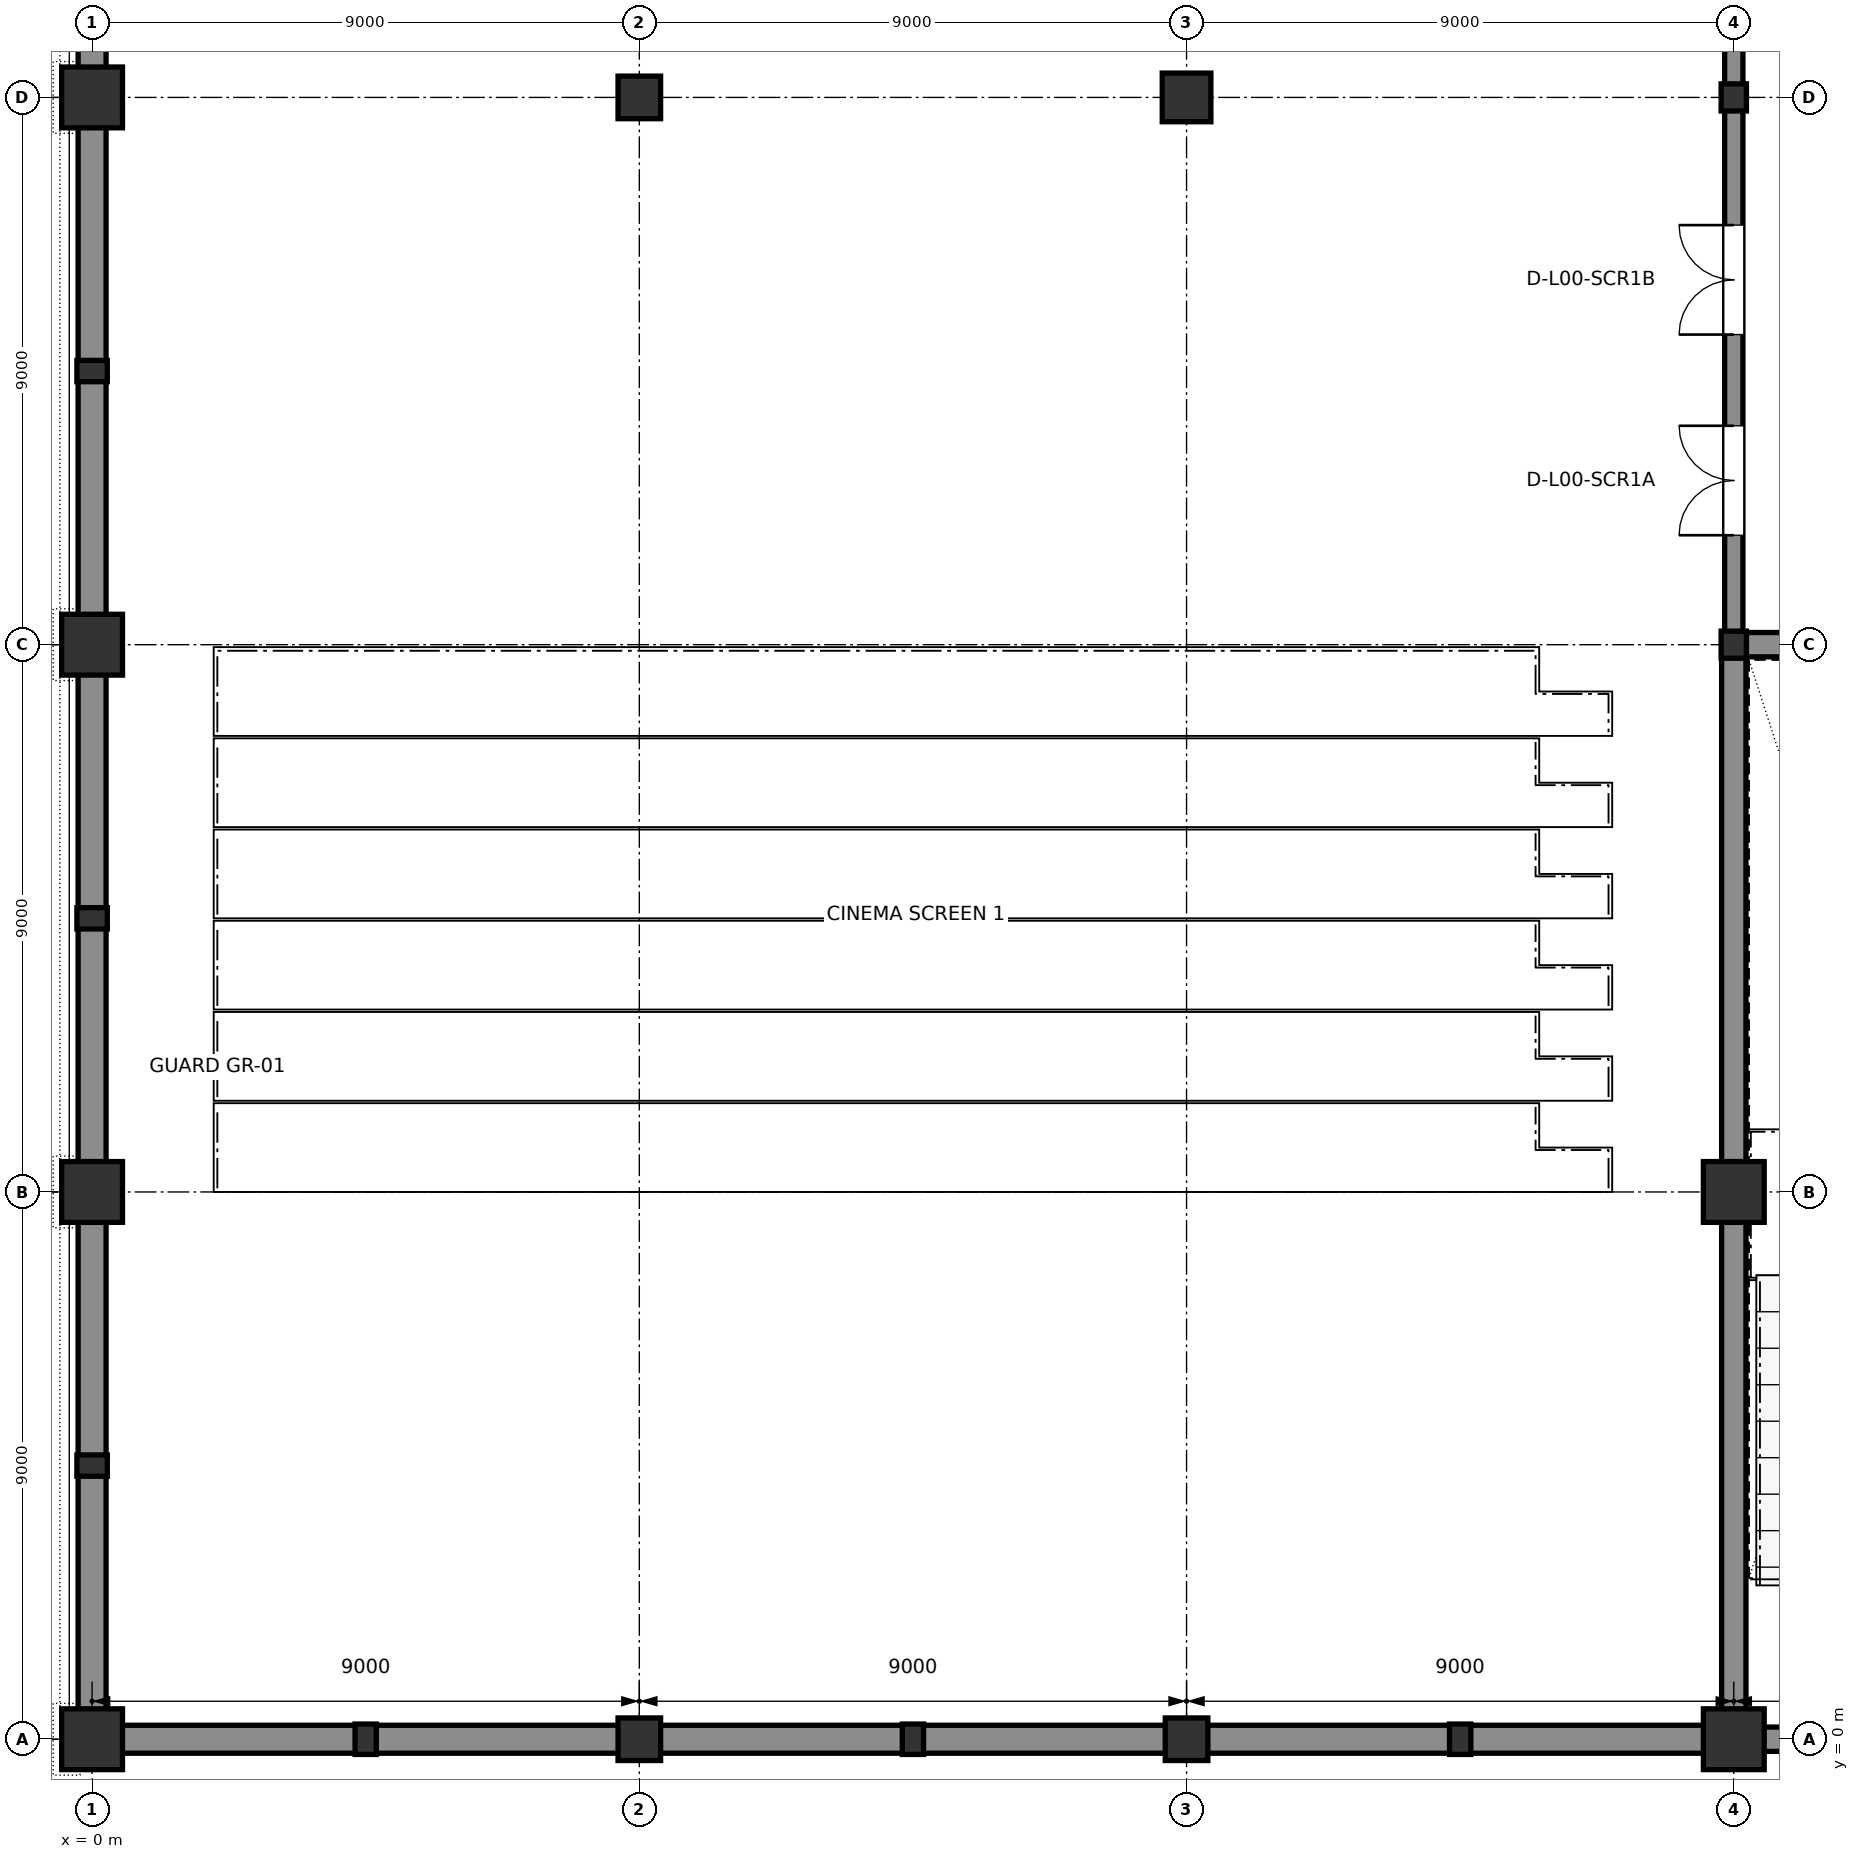
"""IFC4 building model, lengths in metres.
Left out: names, types, materials, properties, quantities, classifications, styles, units other than length and angle.
Written with IfcOpenShell. Run it as: python <this file> out.ifc"""

import sys

from ifc_helpers import new_model, si_unit, direction, frame, frame_2d, origin, origin_2d, place, context, subcontext, project, spatial, rectangle, i_section, extrude, element, fill, save


model = new_model("IFC4")
c1 = context("Model", 3, precision=1e-05, world=origin(), true_north=direction((0.0, 1.0)))
c2 = subcontext(c1, "Body", "Model", "MODEL_VIEW")
j1 = project(units=[si_unit("LENGTHUNIT", "METRE"), si_unit("PLANEANGLEUNIT", "RADIAN")], contexts=[c1])
p1 = place(None, origin())
s1 = spatial("IfcSite", under=j1, at=p1, CompositionType="ELEMENT")
p2 = place(p1, origin())
s2 = spatial("IfcBuilding", under=s1, at=p2, CompositionType="ELEMENT")
p3 = place(p2, origin())
s3 = spatial("IfcBuildingStorey", under=s2, at=p3, CompositionType="ELEMENT", Elevation=0.0)
for number, where, z_axis, x_axis in (
    (1, (4.5, 0.0, 0.0), (0.0, 0.0, 1.0), (1.0, 0.0, 0.0)),
    (2, (13.5, 0.0, 0.0), (0.0, 0.0, 1.0), (1.0, 0.0, 0.0)),
    (3, (22.5, 0.0, 0.0), (0.0, 0.0, 1.0), (1.0, 0.0, 0.0)),
    (4, (0.0, 4.5, 0.0), (0.0, 0.0, 1.0), (0.0, 1.0, 0.0)),
    (5, (0.0, 13.5, 0.0), (0.0, 0.0, 1.0), (0.0, 1.0, 0.0)),
    (6, (0.0, 22.5, 0.0), (0.0, 0.0, 1.0), (0.0, 1.0, 0.0)),
):
    element("IfcColumn", number, at=place(p3, frame(where, z_axis=z_axis, x_axis=x_axis)), inside=s3, PredefinedType="PILASTER", context=c2, shape_type="SweptSolid", body=[
        extrude(rectangle(XDim=0.35, YDim=0.5, at=origin_2d()), origin(), (0.0, 0.0, 1.0), 5.4),
    ])
for number, where, z_axis, x_axis in (
    (7, (0.0, 0.0, 0.0), (0.0, 0.0, 1.0), (1.0, 0.0, 0.0)),
    (8, (0.0, 9.0, 0.0), (0.0, 0.0, 1.0), (1.0, 0.0, 0.0)),
    (9, (0.0, 18.0, 0.0), (0.0, 0.0, 1.0), (1.0, 0.0, 0.0)),
    (10, (0.0, 27.0, 0.0), (0.0, 0.0, 1.0), (1.0, 0.0, 0.0)),
):
    element("IfcColumn", number, at=place(p3, frame(where, z_axis=z_axis, x_axis=x_axis)), inside=s3, PredefinedType="COLUMN", context=c2, shape_type="SweptSolid", body=[
        extrude(rectangle(XDim=1.0, YDim=1.0, at=origin_2d()), origin(), (0.0, 0.0, 1.0), 5.4),
    ])
for number, where, z_axis, x_axis in (
    (11, (9.0, 0.0, 0.0), (0.0, 0.0, 1.0), (1.0, 0.0, 0.0)),
    (12, (9.0, 27.0, 0.0), (0.0, 0.0, 1.0), (1.0, 0.0, 0.0)),
    (13, (18.0, 0.0, 0.0), (0.0, 0.0, 1.0), (1.0, 0.0, 0.0)),
):
    element("IfcColumn", number, at=place(p3, frame(where, z_axis=z_axis, x_axis=x_axis)), inside=s3, PredefinedType="COLUMN", context=c2, shape_type="SweptSolid", body=[
        extrude(rectangle(XDim=0.7, YDim=0.7, at=origin_2d()), origin(), (0.0, 0.0, 1.0), 5.4),
    ])
p4 = place(p3, frame((18.0, 27.0, 0.0), z_axis=(0.0, 0.0, 1.0), x_axis=(1.0, 0.0, 0.0)))
e14 = element("IfcColumn", 14, at=p4, inside=s3, PredefinedType="COLUMN", context=c2, shape_type="SweptSolid", body=[
    extrude(rectangle(XDim=0.8, YDim=0.8, at=origin_2d()), origin(), (0.0, 0.0, 1.0), 5.4),
])
for number, where, z_axis, x_axis in (
    (15, (27.0, 0.0, 0.0), (0.0, 0.0, 1.0), (1.0, 0.0, 0.0)),
    (16, (27.0, 9.0, 0.0), (0.0, 0.0, 1.0), (1.0, 0.0, 0.0)),
):
    element("IfcColumn", number, at=place(p3, frame(where, z_axis=z_axis, x_axis=x_axis)), inside=s3, PredefinedType="COLUMN", context=c2, shape_type="SweptSolid", body=[
        extrude(rectangle(XDim=1.0, YDim=1.0, at=origin_2d()), origin(), (0.0, 0.0, 1.0), 5.4),
    ])
for number, where, z_axis, x_axis in (
    (17, (27.0, 18.0, 0.0), (0.0, 0.0, 1.0), (1.0, 0.0, 0.0)),
    (18, (27.0, 27.0, 0.0), (0.0, 0.0, 1.0), (1.0, 0.0, 0.0)),
):
    element("IfcColumn", number, at=place(p3, frame(where, z_axis=z_axis, x_axis=x_axis)), inside=s3, PredefinedType="COLUMN", context=c2, shape_type="SweptSolid", body=[
        extrude(i_section(OverallWidth=0.416, OverallDepth=0.446, WebThickness=0.025, FlangeThickness=0.04, at=origin_2d()), origin(), (0.0, 0.0, 1.0), 5.4),
    ])
p5 = place(p3, frame((0.0, 35.515, 0.0), z_axis=(0.0, 0.0, 1.0), x_axis=(0.0, -1.0, 0.0)))
e19 = element("IfcWall", 19, at=p5, inside=s3, PredefinedType="STANDARD", context=c2, shape_type="SweptSolid", body=[
    extrude(rectangle(XDim=8.03, YDim=0.46, at=frame_2d((4.015, 0.0))), origin(), (0.0, 0.0, 1.0), 4.795),
])
for number, where, z_axis, x_axis in (
    (20, (0.0, 8.515, 0.0), (0.0, 0.0, 1.0), (0.0, -1.0, 0.0)),
    (21, (0.0, 17.515, 0.0), (0.0, 0.0, 1.0), (0.0, -1.0, 0.0)),
    (22, (0.0, 26.515, 0.0), (0.0, 0.0, 1.0), (0.0, -1.0, 0.0)),
):
    element("IfcWall", number, at=place(p3, frame(where, z_axis=z_axis, x_axis=x_axis)), inside=s3, PredefinedType="STANDARD", context=c2, shape_type="SweptSolid", body=[
        extrude(rectangle(XDim=8.03, YDim=0.46, at=frame_2d((4.015, 0.0))), origin(), (0.0, 0.0, 1.0), 5.4),
    ])
p6 = place(p3, frame((0.485, 0.0, 0.0), z_axis=(0.0, 0.0, 1.0), x_axis=(1.0, 0.0, 0.0)))
e23 = element("IfcWall", 23, at=p6, inside=s3, PredefinedType="STANDARD", context=c2, shape_type="SweptSolid", body=[
    extrude(rectangle(XDim=8.18, YDim=0.46, at=frame_2d((4.09, 0.0))), origin(), (0.0, 0.0, 1.0), 5.4),
])
p7 = place(p3, frame((9.335, 0.0, 0.0), z_axis=(0.0, 0.0, 1.0), x_axis=(1.0, 0.0, 0.0)))
e24 = element("IfcWall", 24, at=p7, inside=s3, PredefinedType="STANDARD", context=c2, shape_type="SweptSolid", body=[
    extrude(rectangle(XDim=8.33, YDim=0.46, at=frame_2d((4.165, 0.0))), origin(), (0.0, 0.0, 1.0), 5.4),
])
p8 = place(p3, frame((18.335, 0.0, 0.0), z_axis=(0.0, 0.0, 1.0), x_axis=(1.0, 0.0, 0.0)))
e25 = element("IfcWall", 25, at=p8, inside=s3, PredefinedType="STANDARD", context=c2, shape_type="SweptSolid", body=[
    extrude(rectangle(XDim=8.18, YDim=0.46, at=frame_2d((4.09, 0.0))), origin(), (0.0, 0.0, 1.0), 5.4),
])
p9 = place(p3, frame((27.0, 0.0, 0.0), z_axis=(0.0, 0.0, 1.0), x_axis=(1.0, 0.0, 0.0)))
e26 = element("IfcWall", 26, at=p9, inside=s3, PredefinedType="SHEAR", context=c2, shape_type="SweptSolid", body=[
    extrude(rectangle(XDim=9.0, YDim=0.4, at=frame_2d((4.5, 0.0))), origin(), (0.0, 0.0, 1.0), 5.16),
])
p10 = place(p9, frame((1.8, 0.0, 0.0)))
e27 = element("IfcOpeningElement", 27, at=p10, cuts=e26, PredefinedType="OPENING", context=c2, shape_type="SweptSolid", body=[
    extrude(rectangle(XDim=1.8, YDim=2.35, at=frame_2d((0.9, 1.175))), frame((0.0, 0.21, 0.0), z_axis=(0.0, -1.0, 0.0), x_axis=(1.0, 0.0, 0.0)), (0.0, 0.0, 1.0), 0.42),
])
p11 = place(p3, frame((36.0, 18.0, 0.0), z_axis=(0.0, 0.0, 1.0), x_axis=(-1.0, 0.0, 0.0)))
e28 = element("IfcWall", 28, at=p11, inside=s3, PredefinedType="SHEAR", context=c2, shape_type="SweptSolid", body=[
    extrude(rectangle(XDim=9.0, YDim=0.4, at=frame_2d((4.5, 0.0))), origin(), (0.0, 0.0, 1.0), 5.16),
])
p12 = place(p3, frame((27.0, 18.0, 0.0), z_axis=(0.0, 0.0, 1.0), x_axis=(0.0, -1.0, 0.0)))
e29 = element("IfcWall", 29, at=p12, inside=s3, PredefinedType="SHEAR", context=c2, shape_type="SweptSolid", body=[
    extrude(rectangle(XDim=18.0, YDim=0.4, at=frame_2d((9.0, 0.0))), origin(), (0.0, 0.0, 1.0), 5.16),
])
p13 = place(p3, frame((27.0, 18.0, 0.0), z_axis=(0.0, 0.0, 1.0), x_axis=(0.0, 1.0, 0.0)))
e30 = element("IfcWall", 30, at=p13, inside=s3, PredefinedType="SHEAR", context=c2, shape_type="SweptSolid", body=[
    extrude(rectangle(XDim=9.0, YDim=0.3, at=frame_2d((4.5, 0.0))), origin(), (0.0, 0.0, 1.0), 5.16),
])
p14 = place(p13, frame((1.8, 0.0, 0.0)))
e31 = element("IfcOpeningElement", 31, at=p14, cuts=e30, PredefinedType="OPENING", context=c2, shape_type="SweptSolid", body=[
    extrude(rectangle(XDim=1.8, YDim=2.28, at=frame_2d((0.9, 1.14))), frame((0.0, 0.16, 0.0), z_axis=(0.0, -1.0, 0.0), x_axis=(1.0, 0.0, 0.0)), (0.0, 0.0, 1.0), 0.32),
])
p15 = place(p13, frame((5.1, 0.0, 0.0)))
e32 = element("IfcOpeningElement", 32, at=p15, cuts=e30, PredefinedType="OPENING", context=c2, shape_type="SweptSolid", body=[
    extrude(rectangle(XDim=1.8, YDim=2.28, at=frame_2d((0.9, 1.14))), frame((0.0, 0.16, 0.0), z_axis=(0.0, -1.0, 0.0), x_axis=(1.0, 0.0, 0.0)), (0.0, 0.0, 1.0), 0.32),
])
p16 = place(p3, frame((27.0, 27.0, 0.0), z_axis=(0.0, 0.0, 1.0), x_axis=(0.0, 1.0, 0.0)))
e33 = element("IfcWall", 33, at=p16, inside=s3, PredefinedType="SHEAR", context=c2, shape_type="SweptSolid", body=[
    extrude(rectangle(XDim=18.0, YDim=0.3, at=frame_2d((9.0, 0.0))), origin(), (0.0, 0.0, 1.0), 5.16),
])
p17 = place(p16, frame((2.2, 0.0, 0.0)))
e34 = element("IfcOpeningElement", 34, at=p17, cuts=e33, PredefinedType="OPENING", context=c2, shape_type="SweptSolid", body=[
    extrude(rectangle(XDim=1.8, YDim=2.28, at=frame_2d((0.9, 1.14))), frame((0.0, 0.16, 0.0), z_axis=(0.0, -1.0, 0.0), x_axis=(1.0, 0.0, 0.0)), (0.0, 0.0, 1.0), 0.32),
])
p18 = place(p16, frame((5.4, 0.0, 0.0)))
e35 = element("IfcOpeningElement", 35, at=p18, cuts=e33, PredefinedType="OPENING", context=c2, shape_type="SweptSolid", body=[
    extrude(rectangle(XDim=1.8, YDim=2.28, at=frame_2d((0.9, 1.14))), frame((0.0, 0.16, 0.0), z_axis=(0.0, -1.0, 0.0), x_axis=(1.0, 0.0, 0.0)), (0.0, 0.0, 1.0), 0.32),
])
p19 = place(p14, origin())
e36 = element("IfcDoor", 36, at=p19, inside=s3, OperationType="DOUBLE_DOOR_SINGLE_SWING", PredefinedType="DOOR", context=c2, shape_type="SweptSolid", body=[
    extrude(rectangle(XDim=1.8, YDim=2.28, at=frame_2d((0.9, 1.14))), frame((0.0, 0.025, 0.0), z_axis=(0.0, -1.0, 0.0), x_axis=(1.0, 0.0, 0.0)), (0.0, 0.0, 1.0), 0.05),
])
fill(e31, e36)
p20 = place(p15, origin())
e37 = element("IfcDoor", 37, at=p20, inside=s3, OperationType="DOUBLE_DOOR_SINGLE_SWING", PredefinedType="DOOR", context=c2, shape_type="SweptSolid", body=[
    extrude(rectangle(XDim=1.8, YDim=2.28, at=frame_2d((0.9, 1.14))), frame((0.0, 0.025, 0.0), z_axis=(0.0, -1.0, 0.0), x_axis=(1.0, 0.0, 0.0)), (0.0, 0.0, 1.0), 0.05),
])
fill(e32, e37)
save(model, sys.argv[1])
